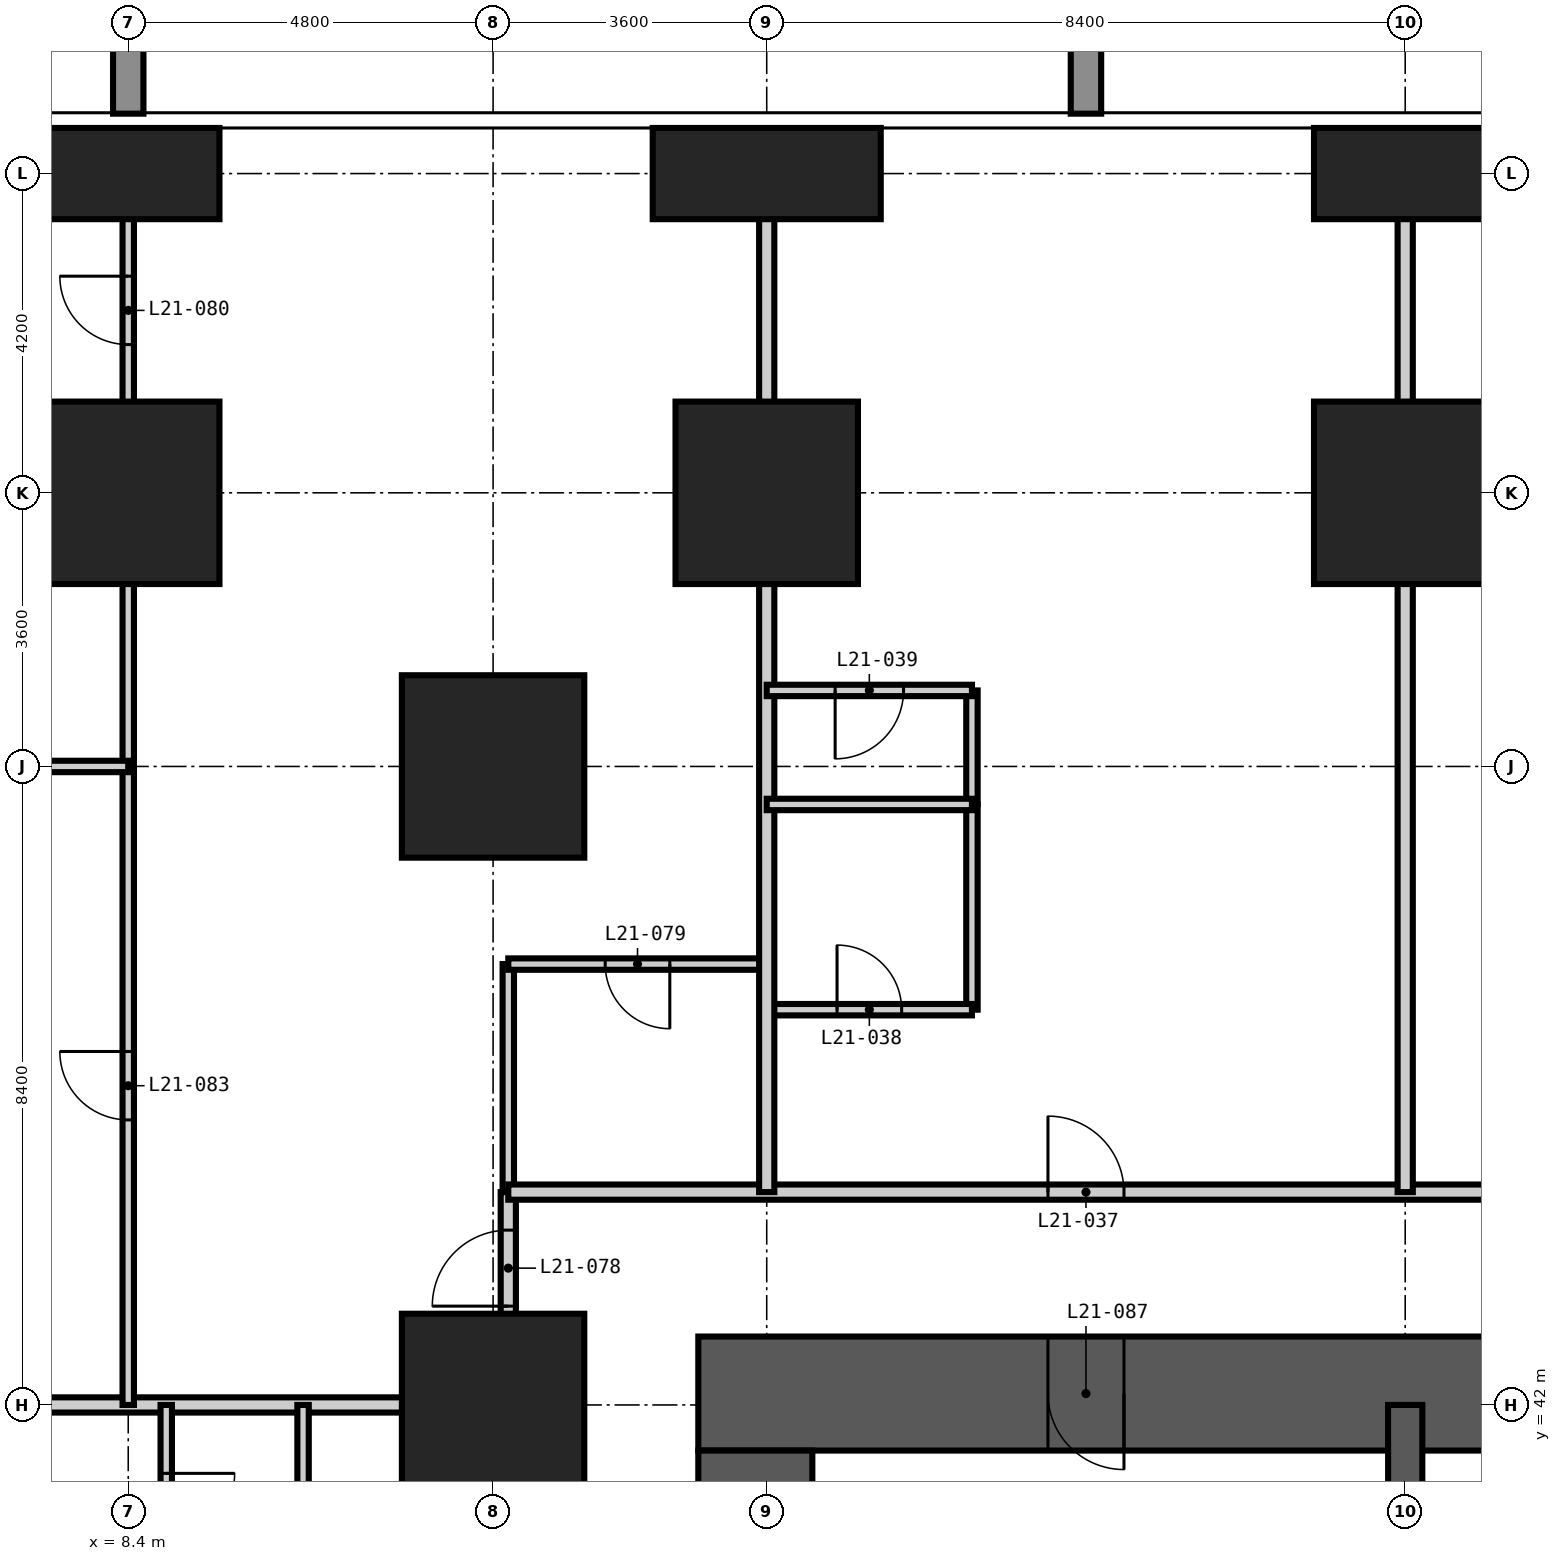
"""IFC4 building model, lengths in metres.
Left out: names, types, materials, properties, quantities, classifications, styles, units other than length and angle.
Written with IfcOpenShell. Run it as: python <this file> out.ifc"""

import sys

from ifc_helpers import new_model, si_unit, direction, frame, frame_2d, origin, origin_2d, place, context, subcontext, project, spatial, rectangle, extrude, element, fill, save


model = new_model("IFC4")
c1 = context("Model", 3, precision=1e-05, world=origin(), true_north=direction((0.0, 1.0)))
c2 = subcontext(c1, "Body", "Model", "MODEL_VIEW")
j1 = project(units=[si_unit("LENGTHUNIT", "METRE"), si_unit("PLANEANGLEUNIT", "RADIAN")], contexts=[c1])
p1 = place(None, origin())
s1 = spatial("IfcSite", under=j1, at=p1, CompositionType="ELEMENT")
p2 = place(p1, origin())
s2 = spatial("IfcBuilding", under=s1, at=p2, CompositionType="ELEMENT")
p3 = place(p2, frame((0.0, 0.0, 84.6)))
s3 = spatial("IfcBuildingStorey", under=s2, at=p3, CompositionType="ELEMENT", Elevation=84.6)
p4 = place(p3, frame((8.4, 54.0, -0.35), z_axis=(0.0, 0.0, 1.0), x_axis=(1.0, 0.0, 0.0)))
e1 = element("IfcColumn", 1, at=p4, inside=s3, PredefinedType="COLUMN", context=c2, shape_type="SweptSolid", body=[
    extrude(rectangle(XDim=2.4, YDim=2.4, at=origin_2d()), origin(), (0.0, 0.0, 1.0), 3.55),
])
p5 = place(p3, frame((8.4, 58.2, -0.35), z_axis=(0.0, 0.0, 1.0), x_axis=(1.0, 0.0, 0.0)))
e2 = element("IfcColumn", 2, at=p5, inside=s3, PredefinedType="COLUMN", context=c2, shape_type="SweptSolid", body=[
    extrude(rectangle(XDim=2.4, YDim=1.2, at=origin_2d()), origin(), (0.0, 0.0, 1.0), 3.55),
])
for number, where, z_axis, x_axis in (
    (3, (13.2, 42.0, -0.35), (0.0, 0.0, 1.0), (1.0, 0.0, 0.0)),
    (4, (13.2, 50.4, -0.35), (0.0, 0.0, 1.0), (1.0, 0.0, 0.0)),
    (5, (16.8, 54.0, -0.35), (0.0, 0.0, 1.0), (1.0, 0.0, 0.0)),
):
    element("IfcColumn", number, at=place(p3, frame(where, z_axis=z_axis, x_axis=x_axis)), inside=s3, PredefinedType="COLUMN", context=c2, shape_type="SweptSolid", body=[
        extrude(rectangle(XDim=2.4, YDim=2.4, at=origin_2d()), origin(), (0.0, 0.0, 1.0), 3.55),
    ])
p6 = place(p3, frame((16.8, 58.2, -0.35), z_axis=(0.0, 0.0, 1.0), x_axis=(1.0, 0.0, 0.0)))
e6 = element("IfcColumn", 6, at=p6, inside=s3, PredefinedType="COLUMN", context=c2, shape_type="SweptSolid", body=[
    extrude(rectangle(XDim=3.0, YDim=1.2, at=origin_2d()), origin(), (0.0, 0.0, 1.0), 3.55),
])
p7 = place(p3, frame((25.2, 54.0, -0.35), z_axis=(0.0, 0.0, 1.0), x_axis=(1.0, 0.0, 0.0)))
e7 = element("IfcColumn", 7, at=p7, inside=s3, PredefinedType="COLUMN", context=c2, shape_type="SweptSolid", body=[
    extrude(rectangle(XDim=2.4, YDim=2.4, at=origin_2d()), origin(), (0.0, 0.0, 1.0), 3.55),
])
p8 = place(p3, frame((25.2, 58.2, -0.35), z_axis=(0.0, 0.0, 1.0), x_axis=(1.0, 0.0, 0.0)))
e8 = element("IfcColumn", 8, at=p8, inside=s3, PredefinedType="COLUMN", context=c2, shape_type="SweptSolid", body=[
    extrude(rectangle(XDim=2.4, YDim=1.2, at=origin_2d()), origin(), (0.0, 0.0, 1.0), 3.55),
])
p9 = place(p3, frame((42.9, 42.15, -0.35), z_axis=(0.0, 0.0, 1.0), x_axis=(-1.0, 0.0, 0.0)))
e9 = element("IfcWall", 9, at=p9, inside=s3, PredefinedType="SHEAR", context=c2, shape_type="SweptSolid", body=[
    extrude(rectangle(XDim=27.0, YDim=1.5, at=frame_2d((13.5, 0.0))), origin(), (0.0, 0.0, 1.0), 3.55),
])
p10 = place(p9, frame((21.4, 0.0, 0.35)))
e10 = element("IfcOpeningElement", 10, at=p10, cuts=e9, PredefinedType="OPENING", context=c2, shape_type="SweptSolid", body=[
    extrude(rectangle(XDim=1.0, YDim=2.1, at=frame_2d((0.5, 1.05))), frame((0.0, 0.76, 0.0), z_axis=(0.0, -1.0, 0.0), x_axis=(1.0, 0.0, 0.0)), (0.0, 0.0, 1.0), 1.52),
])
p11 = place(p9, frame((10.8, 0.0, 0.35)))
e11 = element("IfcOpeningElement", 11, at=p11, cuts=e9, PredefinedType="OPENING", context=c2, shape_type="SweptSolid", body=[
    extrude(rectangle(XDim=1.2, YDim=2.2, at=frame_2d((0.6, 1.1))), frame((0.0, 0.76, 0.0), z_axis=(0.0, -1.0, 0.0), x_axis=(1.0, 0.0, 0.0)), (0.0, 0.0, 1.0), 1.52),
])
p12 = place(p3, frame((16.65, 41.4, -0.35), z_axis=(0.0, 0.0, 1.0), x_axis=(0.0, -1.0, 0.0)))
e12 = element("IfcWall", 12, at=p12, inside=s3, PredefinedType="SHEAR", context=c2, shape_type="SweptSolid", body=[
    extrude(rectangle(XDim=24.0, YDim=1.5, at=frame_2d((12.0, 0.0))), origin(), (0.0, 0.0, 1.0), 3.55),
])
p13 = place(p12, frame((11.1, 0.0, 0.35)))
e13 = element("IfcOpeningElement", 13, at=p13, cuts=e12, PredefinedType="OPENING", context=c2, shape_type="SweptSolid", body=[
    extrude(rectangle(XDim=1.8, YDim=2.2, at=frame_2d((0.9, 1.1))), frame((0.0, 0.76, 0.0), z_axis=(0.0, -1.0, 0.0), x_axis=(1.0, 0.0, 0.0)), (0.0, 0.0, 1.0), 1.52),
])
p14 = place(p12, frame((19.9, 0.0, 0.35)))
e14 = element("IfcOpeningElement", 14, at=p14, cuts=e12, PredefinedType="OPENING", context=c2, shape_type="SweptSolid", body=[
    extrude(rectangle(XDim=1.0, YDim=2.1, at=frame_2d((0.5, 1.05))), frame((0.0, 0.76, 0.0), z_axis=(0.0, -1.0, 0.0), x_axis=(1.0, 0.0, 0.0)), (0.0, 0.0, 1.0), 1.52),
])
p15 = place(p12, frame((5.2, 0.0, 0.35)))
e15 = element("IfcOpeningElement", 15, at=p15, cuts=e12, PredefinedType="OPENING", context=c2, shape_type="SweptSolid", body=[
    extrude(rectangle(XDim=1.0, YDim=2.1, at=frame_2d((0.5, 1.05))), frame((0.0, 0.76, 0.0), z_axis=(0.0, -1.0, 0.0), x_axis=(1.0, 0.0, 0.0)), (0.0, 0.0, 1.0), 1.52),
])
p16 = place(p3, frame((25.2, 16.8, -0.35), z_axis=(0.0, 0.0, 1.0), x_axis=(0.0, 1.0, 0.0)))
e16 = element("IfcWall", 16, at=p16, inside=s3, PredefinedType="SHEAR", context=c2, shape_type="SweptSolid", body=[
    extrude(rectangle(XDim=25.2, YDim=0.45, at=frame_2d((12.6, 0.0))), origin(), (0.0, 0.0, 1.0), 3.55),
])
p17 = place(p3, frame((13.4, 44.8, 0.0), z_axis=(0.0, 0.0, 1.0), x_axis=(0.0, 1.0, 0.0)))
e17 = element("IfcWall", 17, at=p17, inside=s3, PredefinedType="PARTITIONING", context=c2, shape_type="SweptSolid", body=[
    extrude(rectangle(XDim=3.0, YDim=0.15, at=frame_2d((1.5, 0.0))), origin(), (0.0, 0.0, 1.0), 3.2),
])
p18 = place(p3, frame((19.5, 47.2, 0.0), z_axis=(0.0, 0.0, 1.0), x_axis=(0.0, 1.0, 0.0)))
e18 = element("IfcWall", 18, at=p18, inside=s3, PredefinedType="PARTITIONING", context=c2, shape_type="SweptSolid", body=[
    extrude(rectangle(XDim=2.7, YDim=0.15, at=frame_2d((1.35, 0.0))), origin(), (0.0, 0.0, 1.0), 3.2),
])
p19 = place(p3, frame((16.8, 47.2, 0.0), z_axis=(0.0, 0.0, 1.0), x_axis=(1.0, 0.0, 0.0)))
e19 = element("IfcWall", 19, at=p19, inside=s3, PredefinedType="PARTITIONING", context=c2, shape_type="SweptSolid", body=[
    extrude(rectangle(XDim=2.7, YDim=0.15, at=frame_2d((1.35, 0.0))), origin(), (0.0, 0.0, 1.0), 3.2),
])
p20 = place(p19, frame((0.925, 0.0, 0.0)))
e20 = element("IfcOpeningElement", 20, at=p20, cuts=e19, PredefinedType="OPENING", context=c2, shape_type="SweptSolid", body=[
    extrude(rectangle(XDim=0.85, YDim=2.1, at=frame_2d((0.425, 1.05))), frame((0.0, 0.085, 0.0), z_axis=(0.0, -1.0, 0.0), x_axis=(1.0, 0.0, 0.0)), (0.0, 0.0, 1.0), 0.17),
])
p21 = place(p3, frame((13.4, 47.8, 0.0), z_axis=(0.0, 0.0, 1.0), x_axis=(1.0, 0.0, 0.0)))
e21 = element("IfcWall", 21, at=p21, inside=s3, PredefinedType="PARTITIONING", context=c2, shape_type="SweptSolid", body=[
    extrude(rectangle(XDim=3.4, YDim=0.15, at=frame_2d((1.7, 0.0))), origin(), (0.0, 0.0, 1.0), 3.2),
])
p22 = place(p21, frame((1.275, 0.0, 0.0)))
e22 = element("IfcOpeningElement", 22, at=p22, cuts=e21, PredefinedType="OPENING", context=c2, shape_type="SweptSolid", body=[
    extrude(rectangle(XDim=0.85, YDim=2.1, at=frame_2d((0.425, 1.05))), frame((0.0, 0.085, 0.0), z_axis=(0.0, -1.0, 0.0), x_axis=(1.0, 0.0, 0.0)), (0.0, 0.0, 1.0), 0.17),
])
p23 = place(p3, frame((5.4, 54.0, 0.0), z_axis=(0.0, 0.0, 1.0), x_axis=(1.0, 0.0, 0.0)))
e23 = element("IfcWall", 23, at=p23, inside=s3, PredefinedType="PARTITIONING", context=c2, shape_type="SweptSolid", body=[
    extrude(rectangle(XDim=3.0, YDim=0.15, at=frame_2d((1.5, 0.0))), origin(), (0.0, 0.0, 1.0), 3.2),
])
p24 = place(p3, frame((13.4, 37.8, 0.0), z_axis=(0.0, 0.0, 1.0), x_axis=(0.0, 1.0, 0.0)))
e24 = element("IfcWall", 24, at=p24, inside=s3, PredefinedType="PARTITIONING", context=c2, shape_type="SweptSolid", body=[
    extrude(rectangle(XDim=7.0, YDim=0.2, at=frame_2d((3.5, 0.0))), origin(), (0.0, 0.0, 1.0), 3.2),
])
p25 = place(p24, frame((0.25, 0.0, 0.0)))
e25 = element("IfcOpeningElement", 25, at=p25, cuts=e24, PredefinedType="OPENING", context=c2, shape_type="SweptSolid", body=[
    extrude(rectangle(XDim=1.0, YDim=2.2, at=frame_2d((0.5, 1.1))), frame((0.0, 0.11, 0.0), z_axis=(0.0, -1.0, 0.0), x_axis=(1.0, 0.0, 0.0)), (0.0, 0.0, 1.0), 0.22),
])
p26 = place(p24, frame((5.5, 0.0, 0.0)))
e26 = element("IfcOpeningElement", 26, at=p26, cuts=e24, PredefinedType="OPENING", context=c2, shape_type="SweptSolid", body=[
    extrude(rectangle(XDim=1.0, YDim=2.2, at=frame_2d((0.5, 1.1))), frame((0.0, 0.11, 0.0), z_axis=(0.0, -1.0, 0.0), x_axis=(1.0, 0.0, 0.0)), (0.0, 0.0, 1.0), 0.22),
])
p27 = place(p3, frame((13.4, 44.8, 0.0), z_axis=(0.0, 0.0, 1.0), x_axis=(1.0, 0.0, 0.0)))
e27 = element("IfcWall", 27, at=p27, inside=s3, PredefinedType="PARTITIONING", context=c2, shape_type="SweptSolid", body=[
    extrude(rectangle(XDim=32.6, YDim=0.2, at=frame_2d((16.3, 0.0))), origin(), (0.0, 0.0, 1.0), 3.2),
])
p28 = place(p27, frame((7.1, 0.0, 0.0)))
e28 = element("IfcOpeningElement", 28, at=p28, cuts=e27, PredefinedType="OPENING", context=c2, shape_type="SweptSolid", body=[
    extrude(rectangle(XDim=1.0, YDim=2.2, at=frame_2d((0.5, 1.1))), frame((0.0, 0.11, 0.0), z_axis=(0.0, -1.0, 0.0), x_axis=(1.0, 0.0, 0.0)), (0.0, 0.0, 1.0), 0.22),
])
p29 = place(p27, frame((15.5, 0.0, 0.0)))
e29 = element("IfcOpeningElement", 29, at=p29, cuts=e27, PredefinedType="OPENING", context=c2, shape_type="SweptSolid", body=[
    extrude(rectangle(XDim=1.0, YDim=2.2, at=frame_2d((0.5, 1.1))), frame((0.0, 0.11, 0.0), z_axis=(0.0, -1.0, 0.0), x_axis=(1.0, 0.0, 0.0)), (0.0, 0.0, 1.0), 0.22),
])
p30 = place(p27, frame((23.9, 0.0, 0.0)))
e30 = element("IfcOpeningElement", 30, at=p30, cuts=e27, PredefinedType="OPENING", context=c2, shape_type="SweptSolid", body=[
    extrude(rectangle(XDim=1.0, YDim=2.2, at=frame_2d((0.5, 1.1))), frame((0.0, 0.11, 0.0), z_axis=(0.0, -1.0, 0.0), x_axis=(1.0, 0.0, 0.0)), (0.0, 0.0, 1.0), 0.22),
])
for number, where, z_axis, x_axis in (
    (31, (16.8, 44.8, 0.0), (0.0, 0.0, 1.0), (0.0, 1.0, 0.0)),
    (32, (25.2, 44.8, 0.0), (0.0, 0.0, 1.0), (0.0, 1.0, 0.0)),
):
    element("IfcWall", number, at=place(p3, frame(where, z_axis=z_axis, x_axis=x_axis)), inside=s3, PredefinedType="PARTITIONING", context=c2, shape_type="SweptSolid", body=[
        extrude(rectangle(XDim=14.008, YDim=0.2, at=frame_2d((7.004, 0.0))), origin(), (0.0, 0.0, 1.0), 3.2),
    ])
p31 = place(p3, frame((-0.008, 42.0, 0.0), z_axis=(0.0, 0.0, 1.0), x_axis=(1.0, 0.0, 0.0)))
e33 = element("IfcWall", 33, at=p31, inside=s3, PredefinedType="PARTITIONING", context=c2, shape_type="SweptSolid", body=[
    extrude(rectangle(XDim=13.408, YDim=0.2, at=frame_2d((6.704, 0.0))), origin(), (0.0, 0.0, 1.0), 3.2),
])
p32 = place(p3, frame((8.4, 42.0, 0.0), z_axis=(0.0, 0.0, 1.0), x_axis=(0.0, 1.0, 0.0)))
e34 = element("IfcWall", 34, at=p32, inside=s3, PredefinedType="PARTITIONING", context=c2, shape_type="SweptSolid", body=[
    extrude(rectangle(XDim=16.808, YDim=0.15, at=frame_2d((8.404, 0.0))), origin(), (0.0, 0.0, 1.0), 3.2),
])
p33 = place(p32, frame((13.95, 0.0, 0.0)))
e35 = element("IfcOpeningElement", 35, at=p33, cuts=e34, PredefinedType="OPENING", context=c2, shape_type="SweptSolid", body=[
    extrude(rectangle(XDim=0.9, YDim=2.1, at=frame_2d((0.45, 1.05))), frame((0.0, 0.085, 0.0), z_axis=(0.0, -1.0, 0.0), x_axis=(1.0, 0.0, 0.0)), (0.0, 0.0, 1.0), 0.17),
])
p34 = place(p32, frame((3.75, 0.0, 0.0)))
e36 = element("IfcOpeningElement", 36, at=p34, cuts=e34, PredefinedType="OPENING", context=c2, shape_type="SweptSolid", body=[
    extrude(rectangle(XDim=0.9, YDim=2.1, at=frame_2d((0.45, 1.05))), frame((0.0, 0.085, 0.0), z_axis=(0.0, -1.0, 0.0), x_axis=(1.0, 0.0, 0.0)), (0.0, 0.0, 1.0), 0.17),
])
p35 = place(p3, frame((8.9, 39.3, 0.0), z_axis=(0.0, 0.0, 1.0), x_axis=(0.0, 1.0, 0.0)))
e37 = element("IfcWall", 37, at=p35, inside=s3, PredefinedType="PARTITIONING", context=c2, shape_type="SweptSolid", body=[
    extrude(rectangle(XDim=2.7, YDim=0.15, at=frame_2d((1.35, 0.0))), origin(), (0.0, 0.0, 1.0), 3.2),
])
p36 = place(p35, frame((0.9, 0.0, 0.0)))
e38 = element("IfcOpeningElement", 38, at=p36, cuts=e37, PredefinedType="OPENING", context=c2, shape_type="SweptSolid", body=[
    extrude(rectangle(XDim=0.9, YDim=2.1, at=frame_2d((0.45, 1.05))), frame((0.0, 0.085, 0.0), z_axis=(0.0, -1.0, 0.0), x_axis=(1.0, 0.0, 0.0)), (0.0, 0.0, 1.0), 0.17),
])
p37 = place(p3, frame((10.7, 39.3, 0.0), z_axis=(0.0, 0.0, 1.0), x_axis=(0.0, 1.0, 0.0)))
e39 = element("IfcWall", 39, at=p37, inside=s3, PredefinedType="PARTITIONING", context=c2, shape_type="SweptSolid", body=[
    extrude(rectangle(XDim=2.7, YDim=0.15, at=frame_2d((1.35, 0.0))), origin(), (0.0, 0.0, 1.0), 3.2),
])
p38 = place(p3, frame((19.5, 49.9, 0.0), z_axis=(0.0, 0.0, 1.0), x_axis=(0.0, 1.0, 0.0)))
e40 = element("IfcWall", 40, at=p38, inside=s3, PredefinedType="PARTITIONING", context=c2, shape_type="SweptSolid", body=[
    extrude(rectangle(XDim=1.5, YDim=0.15, at=frame_2d((0.75, 0.0))), origin(), (0.0, 0.0, 1.0), 3.2),
])
p39 = place(p3, frame((16.8, 49.9, 0.0), z_axis=(0.0, 0.0, 1.0), x_axis=(1.0, 0.0, 0.0)))
e41 = element("IfcWall", 41, at=p39, inside=s3, PredefinedType="PARTITIONING", context=c2, shape_type="SweptSolid", body=[
    extrude(rectangle(XDim=2.7, YDim=0.15, at=frame_2d((1.35, 0.0))), origin(), (0.0, 0.0, 1.0), 3.2),
])
p40 = place(p3, frame((-0.008, 50.4, 0.0), z_axis=(0.0, 0.0, 1.0), x_axis=(1.0, 0.0, 0.0)))
e42 = element("IfcWall", 42, at=p40, inside=s3, PredefinedType="PARTITIONING", context=c2, shape_type="SweptSolid", body=[
    extrude(rectangle(XDim=8.408, YDim=0.15, at=frame_2d((4.204, 0.0))), origin(), (0.0, 0.0, 1.0), 3.2),
])
p41 = place(p40, frame((2.658, 0.0, 0.0)))
e43 = element("IfcOpeningElement", 43, at=p41, cuts=e42, PredefinedType="OPENING", context=c2, shape_type="SweptSolid", body=[
    extrude(rectangle(XDim=0.9, YDim=2.1, at=frame_2d((0.45, 1.05))), frame((0.0, 0.085, 0.0), z_axis=(0.0, -1.0, 0.0), x_axis=(1.0, 0.0, 0.0)), (0.0, 0.0, 1.0), 0.17),
])
p42 = place(p3, frame((16.8, 51.4, 0.0), z_axis=(0.0, 0.0, 1.0), x_axis=(1.0, 0.0, 0.0)))
e44 = element("IfcWall", 44, at=p42, inside=s3, PredefinedType="PARTITIONING", context=c2, shape_type="SweptSolid", body=[
    extrude(rectangle(XDim=2.7, YDim=0.15, at=frame_2d((1.35, 0.0))), origin(), (0.0, 0.0, 1.0), 3.2),
])
p43 = place(p42, frame((0.9, 0.0, 0.0)))
e45 = element("IfcOpeningElement", 45, at=p43, cuts=e44, PredefinedType="OPENING", context=c2, shape_type="SweptSolid", body=[
    extrude(rectangle(XDim=0.9, YDim=2.1, at=frame_2d((0.45, 1.05))), frame((0.0, 0.085, 0.0), z_axis=(0.0, -1.0, 0.0), x_axis=(1.0, 0.0, 0.0)), (0.0, 0.0, 1.0), 0.17),
])
p44 = place(p28, origin())
e46 = element("IfcDoor", 46, at=p44, inside=s3, OperationType="SINGLE_SWING_LEFT", PredefinedType="DOOR", context=c2, shape_type="SweptSolid", body=[
    extrude(rectangle(XDim=1.0, YDim=2.2, at=frame_2d((0.5, 1.1))), frame((0.0, 0.025, 0.0), z_axis=(0.0, -1.0, 0.0), x_axis=(1.0, 0.0, 0.0)), (0.0, 0.0, 1.0), 0.05),
])
fill(e28, e46)
p45 = place(p20, origin())
e47 = element("IfcDoor", 47, at=p45, inside=s3, OperationType="SINGLE_SWING_LEFT", PredefinedType="DOOR", context=c2, shape_type="SweptSolid", body=[
    extrude(rectangle(XDim=0.85, YDim=2.1, at=frame_2d((0.425, 1.05))), frame((0.0, 0.025, 0.0), z_axis=(0.0, -1.0, 0.0), x_axis=(1.0, 0.0, 0.0)), (0.0, 0.0, 1.0), 0.05),
])
fill(e20, e47)
p46 = place(p43, frame((0.9, 0.0, 0.0), z_axis=(0.0, 0.0, 1.0), x_axis=(-1.0, 0.0, 0.0)))
e48 = element("IfcDoor", 48, at=p46, inside=s3, OperationType="SINGLE_SWING_RIGHT", PredefinedType="DOOR", context=c2, shape_type="SweptSolid", body=[
    extrude(rectangle(XDim=0.9, YDim=2.1, at=frame_2d((0.45, 1.05))), frame((0.0, 0.025, 0.0), z_axis=(0.0, -1.0, 0.0), x_axis=(1.0, 0.0, 0.0)), (0.0, 0.0, 1.0), 0.05),
])
fill(e45, e48)
p47 = place(p36, frame((0.9, 0.0, 0.0), z_axis=(0.0, 0.0, 1.0), x_axis=(-1.0, 0.0, 0.0)))
e49 = element("IfcDoor", 49, at=p47, inside=s3, OperationType="SINGLE_SWING_LEFT", PredefinedType="DOOR", context=c2, shape_type="SweptSolid", body=[
    extrude(rectangle(XDim=0.9, YDim=2.1, at=frame_2d((0.45, 1.05))), frame((0.0, 0.025, 0.0), z_axis=(0.0, -1.0, 0.0), x_axis=(1.0, 0.0, 0.0)), (0.0, 0.0, 1.0), 0.05),
])
fill(e38, e49)
p48 = place(p26, origin())
e50 = element("IfcDoor", 50, at=p48, inside=s3, OperationType="SINGLE_SWING_LEFT", PredefinedType="DOOR", context=c2, shape_type="SweptSolid", body=[
    extrude(rectangle(XDim=1.0, YDim=2.2, at=frame_2d((0.5, 1.1))), frame((0.0, 0.025, 0.0), z_axis=(0.0, -1.0, 0.0), x_axis=(1.0, 0.0, 0.0)), (0.0, 0.0, 1.0), 0.05),
])
fill(e26, e50)
p49 = place(p22, frame((0.85, 0.0, 0.0), z_axis=(0.0, 0.0, 1.0), x_axis=(-1.0, 0.0, 0.0)))
e51 = element("IfcDoor", 51, at=p49, inside=s3, OperationType="SINGLE_SWING_LEFT", PredefinedType="DOOR", context=c2, shape_type="SweptSolid", body=[
    extrude(rectangle(XDim=0.85, YDim=2.1, at=frame_2d((0.425, 1.05))), frame((0.0, 0.025, 0.0), z_axis=(0.0, -1.0, 0.0), x_axis=(1.0, 0.0, 0.0)), (0.0, 0.0, 1.0), 0.05),
])
fill(e22, e51)
p50 = place(p33, origin())
e52 = element("IfcDoor", 52, at=p50, inside=s3, OperationType="SINGLE_SWING_RIGHT", PredefinedType="DOOR", context=c2, shape_type="SweptSolid", body=[
    extrude(rectangle(XDim=0.9, YDim=2.1, at=frame_2d((0.45, 1.05))), frame((0.0, 0.025, 0.0), z_axis=(0.0, -1.0, 0.0), x_axis=(1.0, 0.0, 0.0)), (0.0, 0.0, 1.0), 0.05),
])
fill(e35, e52)
p51 = place(p34, origin())
e53 = element("IfcDoor", 53, at=p51, inside=s3, OperationType="SINGLE_SWING_RIGHT", PredefinedType="DOOR", context=c2, shape_type="SweptSolid", body=[
    extrude(rectangle(XDim=0.9, YDim=2.1, at=frame_2d((0.45, 1.05))), frame((0.0, 0.025, 0.0), z_axis=(0.0, -1.0, 0.0), x_axis=(1.0, 0.0, 0.0)), (0.0, 0.0, 1.0), 0.05),
])
fill(e36, e53)
p52 = place(p10, origin())
e54 = element("IfcDoor", 54, at=p52, inside=s3, OperationType="SINGLE_SWING_LEFT", PredefinedType="DOOR", context=c2, shape_type="SweptSolid", body=[
    extrude(rectangle(XDim=1.0, YDim=2.1, at=frame_2d((0.5, 1.05))), frame((0.0, 0.025, 0.0), z_axis=(0.0, -1.0, 0.0), x_axis=(1.0, 0.0, 0.0)), (0.0, 0.0, 1.0), 0.05),
])
fill(e10, e54)
save(model, sys.argv[1])
